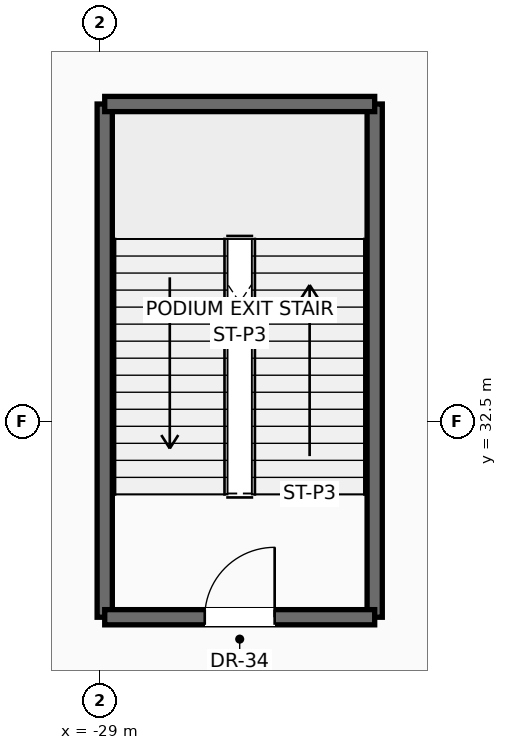
"""IFC4 building model, lengths in metres.
Left out: names, types, materials, properties, quantities, classifications, styles, units other than length and angle.
Written with IfcOpenShell. Run it as: python <this file> out.ifc"""

import sys

from ifc_helpers import new_model, si_unit, direction, frame, frame_2d, origin, place, context, subcontext, project, spatial, rectangle, extrude, source, transform, mapped, element, fill, save


model = new_model("IFC4")
c1 = context("Model", 3, precision=1e-05, world=origin(), true_north=direction((0.0, 1.0)))
c2 = subcontext(c1, "Body", "Model", "MODEL_VIEW")
j1 = project(units=[si_unit("LENGTHUNIT", "METRE"), si_unit("PLANEANGLEUNIT", "RADIAN")], contexts=[c1])
p1 = place(None, origin())
s1 = spatial("IfcSite", under=j1, at=p1, CompositionType="ELEMENT")
p2 = place(p1, origin())
s2 = spatial("IfcBuilding", under=s1, at=p2, CompositionType="ELEMENT")
p3 = place(p2, frame((0.0, 0.0, 11.0)))
s3 = spatial("IfcBuildingStorey", under=s2, at=p3, CompositionType="ELEMENT", Elevation=11.0)
for number, where, z_axis, x_axis in (
    (1, (-28.92, 29.28, 0.0), (0.0, 0.0, 1.0), (0.0, 1.0, 0.0)),
    (2, (-24.48, 29.28, 0.0), (0.0, 0.0, 1.0), (0.0, 1.0, 0.0)),
):
    element("IfcWall", number, at=place(p3, frame(where, z_axis=z_axis, x_axis=x_axis)), inside=s3, PredefinedType="SOLIDWALL", context=c2, shape_type="SweptSolid", body=[
        extrude(rectangle(XDim=8.44, YDim=0.25, at=frame_2d((4.22, 0.0))), origin(), (0.0, 0.0, 1.0), 5.185),
    ])
p4 = place(p3, frame((-28.92, 29.28, 0.0), z_axis=(0.0, 0.0, 1.0), x_axis=(1.0, 0.0, 0.0)))
e3 = element("IfcWall", 3, at=p4, inside=s3, PredefinedType="SOLIDWALL", context=c2, shape_type="SweptSolid", body=[
    extrude(rectangle(XDim=4.44, YDim=0.25, at=frame_2d((2.22, 0.0))), origin(), (0.0, 0.0, 1.0), 5.185),
])
p5 = place(p4, frame((1.645, 0.0, 0.0)))
e4 = element("IfcOpeningElement", 4, at=p5, cuts=e3, PredefinedType="OPENING", context=c2, shape_type="SweptSolid", body=[
    extrude(rectangle(XDim=1.15, YDim=2.2, at=frame_2d((0.575, 1.1))), frame((0.0, 0.135, 0.0), z_axis=(0.0, -1.0, 0.0), x_axis=(1.0, 0.0, 0.0)), (0.0, 0.0, 1.0), 0.27),
])
p6 = place(p3, frame((-24.48, 37.72, 0.0), z_axis=(0.0, 0.0, 1.0), x_axis=(-1.0, 0.0, 0.0)))
e5 = element("IfcWall", 5, at=p6, inside=s3, PredefinedType="SOLIDWALL", context=c2, shape_type="SweptSolid", body=[
    extrude(rectangle(XDim=4.44, YDim=0.25, at=frame_2d((2.22, 0.0))), origin(), (0.0, 0.0, 1.0), 5.185),
])
m1 = source(origin(), c2, "Body", "SweptSolid", [
    extrude(rectangle(XDim=1.15, YDim=2.2, at=frame_2d((0.575, 1.1))), frame((0.0, 0.025, 0.0), z_axis=(0.0, -1.0, 0.0), x_axis=(1.0, 0.0, 0.0)), (0.0, 0.0, 1.0), 0.05),
])
p7 = place(p5, origin())
e6 = element("IfcDoor", 6, at=p7, inside=s3, OperationType="SINGLE_SWING_RIGHT", PredefinedType="DOOR", context=c2, shape_type="MappedRepresentation", body=[
    mapped(m1, transform((0.0, 0.0, 0.0), scale=1.0)),
])
fill(e4, e6)
save(model, sys.argv[1])
